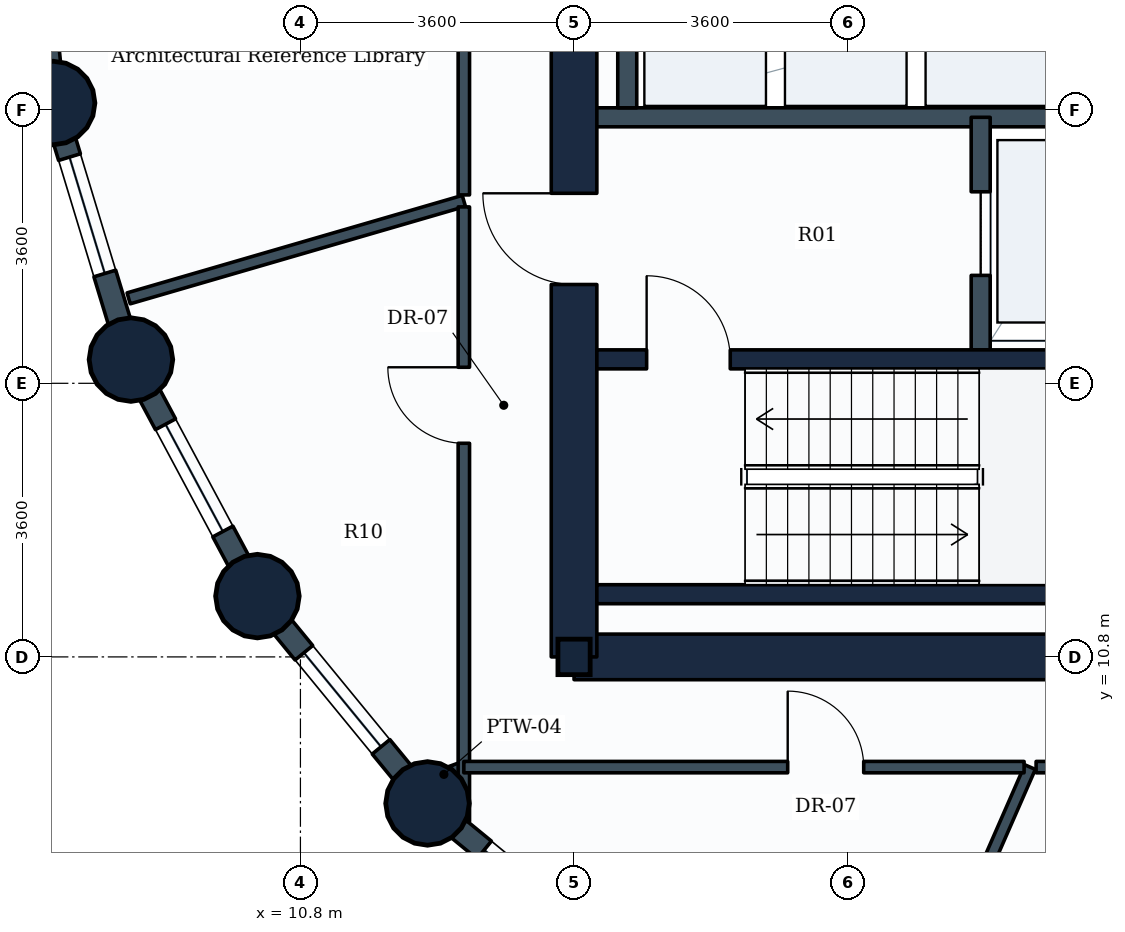
"""IFC4 building model, lengths in metres.
Left out: names, types, materials, properties, quantities, classifications, styles, units other than length and angle.
Written with IfcOpenShell. Run it as: python <this file> out.ifc"""

import sys

from ifc_helpers import new_model, si_unit, direction, frame, frame_2d, origin, origin_2d, place, context, subcontext, project, spatial, rectangle, circle, i_section, extrude, element, fill, save


model = new_model("IFC4")
c1 = context("Model", 3, precision=1e-05, world=origin(), true_north=direction((0.0, 1.0)))
c2 = subcontext(c1, "Body", "Model", "MODEL_VIEW")
j1 = project(units=[si_unit("LENGTHUNIT", "METRE"), si_unit("PLANEANGLEUNIT", "RADIAN")], contexts=[c1])
p1 = place(None, origin())
s1 = spatial("IfcSite", under=j1, at=p1, CompositionType="ELEMENT")
p2 = place(p1, origin())
s2 = spatial("IfcBuilding", under=s1, at=p2, CompositionType="ELEMENT")
p3 = place(p2, frame((0.0, 0.0, 84.0)))
s3 = spatial("IfcBuildingStorey", under=s2, at=p3, CompositionType="ELEMENT", Elevation=84.0)
for number, where, z_axis, x_axis in (
    (1, (7.546, 18.088, 0.0), (0.0, 0.0, 1.0), (1.0, 0.0, 0.0)),
    (2, (8.57, 14.712, 0.0), (0.0, 0.0, 1.0), (1.0, 0.0, 0.0)),
    (3, (10.234, 11.6, 0.0), (0.0, 0.0, 1.0), (1.0, 0.0, 0.0)),
    (4, (12.472, 8.872, 0.0), (0.0, 0.0, 1.0), (1.0, 0.0, 0.0)),
):
    element("IfcColumn", number, at=place(p3, frame(where, z_axis=z_axis, x_axis=x_axis)), inside=s3, PredefinedType="COLUMN", context=c2, shape_type="SweptSolid", body=[
        extrude(circle(Radius=0.55, at=origin_2d()), origin(), (0.0, 0.0, 1.0), 3.9),
    ])
p4 = place(p3, frame((14.4, 10.8, 0.0), z_axis=(0.0, 0.0, 1.0), x_axis=(1.0, 0.0, 0.0)))
e5 = element("IfcColumn", 5, at=p4, inside=s3, PredefinedType="COLUMN", context=c2, shape_type="SweptSolid", body=[
    extrude(i_section(OverallWidth=0.424, OverallDepth=0.467, WebThickness=0.033, FlangeThickness=0.053, FilletRadius=0.015, at=origin_2d()), origin(), (0.0, 0.0, 1.0), 3.9),
])
p5 = place(p3, frame((7.546, 18.088, 0.0), z_axis=(0.0, 0.0, 1.0), x_axis=(-0.09802417461, 0.995184033831, 0.0)))
e6 = element("IfcWall", 6, at=p5, inside=s3, PredefinedType="STANDARD", context=c2, shape_type="SweptSolid", body=[
    extrude(rectangle(XDim=3.529, YDim=0.3, at=frame_2d((1.765, 0.0))), origin(), (0.0, 0.0, 1.0), 2.93),
])
p6 = place(p5, frame((0.965, 0.0, 0.85)))
e7 = element("IfcOpeningElement", 7, at=p6, cuts=e6, PredefinedType="OPENING", context=c2, shape_type="SweptSolid", body=[
    extrude(rectangle(XDim=1.6, YDim=1.35, at=frame_2d((0.8, 0.675))), frame((0.0, 0.16, 0.0), z_axis=(0.0, -1.0, 0.0), x_axis=(1.0, 0.0, 0.0)), (0.0, 0.0, 1.0), 0.32),
])
p7 = place(p3, frame((8.57, 14.712, 0.0), z_axis=(0.0, 0.0, 1.0), x_axis=(-0.290305086481, 0.956934144423, 0.0)))
e8 = element("IfcWall", 8, at=p7, inside=s3, PredefinedType="STANDARD", context=c2, shape_type="SweptSolid", body=[
    extrude(rectangle(XDim=3.528, YDim=0.3, at=frame_2d((1.764, 0.0))), origin(), (0.0, 0.0, 1.0), 2.93),
])
p8 = place(p7, frame((1.184, 0.0, 0.85)))
e9 = element("IfcOpeningElement", 9, at=p8, cuts=e8, PredefinedType="OPENING", context=c2, shape_type="SweptSolid", body=[
    extrude(rectangle(XDim=1.6, YDim=1.35, at=frame_2d((0.8, 0.675))), frame((0.0, 0.16, 0.0), z_axis=(0.0, -1.0, 0.0), x_axis=(1.0, 0.0, 0.0)), (0.0, 0.0, 1.0), 0.32),
])
p9 = place(p3, frame((10.234, 11.6, 0.0), z_axis=(0.0, 0.0, 1.0), x_axis=(-0.47151087309, 0.881860247748, 0.0)))
e10 = element("IfcWall", 10, at=p9, inside=s3, PredefinedType="STANDARD", context=c2, shape_type="SweptSolid", body=[
    extrude(rectangle(XDim=3.529, YDim=0.3, at=frame_2d((1.764, 0.0))), origin(), (0.0, 0.0, 1.0), 2.93),
])
p10 = place(p9, frame((0.964, 0.0, 0.85)))
e11 = element("IfcOpeningElement", 11, at=p10, cuts=e10, PredefinedType="OPENING", context=c2, shape_type="SweptSolid", body=[
    extrude(rectangle(XDim=1.6, YDim=1.35, at=frame_2d((0.8, 0.675))), frame((0.0, 0.16, 0.0), z_axis=(0.0, -1.0, 0.0), x_axis=(1.0, 0.0, 0.0)), (0.0, 0.0, 1.0), 0.32),
])
p11 = place(p3, frame((12.472, 8.872, 0.0), z_axis=(0.0, 0.0, 1.0), x_axis=(-0.634258295121, 0.773121216285, 0.0)))
e12 = element("IfcWall", 12, at=p11, inside=s3, PredefinedType="STANDARD", context=c2, shape_type="SweptSolid", body=[
    extrude(rectangle(XDim=3.529, YDim=0.3, at=frame_2d((1.764, 0.0))), origin(), (0.0, 0.0, 1.0), 2.93),
])
p12 = place(p11, frame((0.964, 0.0, 0.85)))
e13 = element("IfcOpeningElement", 13, at=p12, cuts=e12, PredefinedType="OPENING", context=c2, shape_type="SweptSolid", body=[
    extrude(rectangle(XDim=1.6, YDim=1.35, at=frame_2d((0.8, 0.675))), frame((0.0, 0.16, 0.0), z_axis=(0.0, -1.0, 0.0), x_axis=(1.0, 0.0, 0.0)), (0.0, 0.0, 1.0), 0.32),
])
p13 = place(p3, frame((15.2, 6.634, 0.0), z_axis=(0.0, 0.0, 1.0), x_axis=(-0.773121216285, 0.634258295121, 0.0)))
e14 = element("IfcWall", 14, at=p13, inside=s3, PredefinedType="STANDARD", context=c2, shape_type="SweptSolid", body=[
    extrude(rectangle(XDim=3.529, YDim=0.3, at=frame_2d((1.764, 0.0))), origin(), (0.0, 0.0, 1.0), 2.93),
])
p14 = place(p13, frame((0.964, 0.0, 0.85)))
e15 = element("IfcOpeningElement", 15, at=p14, cuts=e14, PredefinedType="OPENING", context=c2, shape_type="SweptSolid", body=[
    extrude(rectangle(XDim=1.6, YDim=1.35, at=frame_2d((0.8, 0.675))), frame((0.0, 0.16, 0.0), z_axis=(0.0, -1.0, 0.0), x_axis=(1.0, 0.0, 0.0)), (0.0, 0.0, 1.0), 0.32),
])
p15 = place(p3, frame((14.4, 10.8, 0.0), z_axis=(0.0, 0.0, 1.0), x_axis=(1.0, 0.0, 0.0)))
e16 = element("IfcWall", 16, at=p15, inside=s3, PredefinedType="SHEAR", context=c2, shape_type="SweptSolid", body=[
    extrude(rectangle(XDim=18.0, YDim=0.6, at=frame_2d((9.0, 0.0))), origin(), (0.0, 0.0, 1.0), 3.65),
])
p16 = place(p3, frame((14.4, 10.8, 0.0), z_axis=(0.0, 0.0, 1.0), x_axis=(0.0, 1.0, 0.0)))
e17 = element("IfcWall", 17, at=p16, inside=s3, PredefinedType="SHEAR", context=c2, shape_type="SweptSolid", body=[
    extrude(rectangle(XDim=14.4, YDim=0.6, at=frame_2d((7.2, 0.0))), origin(), (0.0, 0.0, 1.0), 3.65),
])
p17 = place(p16, frame((11.05, 0.0, 0.0)))
e18 = element("IfcOpeningElement", 18, at=p17, cuts=e17, PredefinedType="OPENING", context=c2, shape_type="SweptSolid", body=[
    extrude(rectangle(XDim=1.1, YDim=2.1, at=frame_2d((0.55, 1.05))), frame((0.0, 0.31, 0.0), z_axis=(0.0, -1.0, 0.0), x_axis=(1.0, 0.0, 0.0)), (0.0, 0.0, 1.0), 0.62),
])
p18 = place(p16, frame((4.9, 0.0, 0.0)))
e19 = element("IfcOpeningElement", 19, at=p18, cuts=e17, PredefinedType="OPENING", context=c2, shape_type="SweptSolid", body=[
    extrude(rectangle(XDim=1.2, YDim=2.1, at=frame_2d((0.6, 1.05))), frame((0.0, 0.31, 0.0), z_axis=(0.0, -1.0, 0.0), x_axis=(1.0, 0.0, 0.0)), (0.0, 0.0, 1.0), 0.62),
])
p19 = place(p3, frame((14.7, 11.625, 0.0), z_axis=(0.0, 0.0, 1.0), x_axis=(1.0, 0.0, 0.0)))
e20 = element("IfcWall", 20, at=p19, inside=s3, PredefinedType="SHEAR", context=c2, shape_type="SweptSolid", body=[
    extrude(rectangle(XDim=8.65, YDim=0.25, at=frame_2d((4.325, 0.0))), origin(), (0.0, 0.0, 1.0), 3.65),
])
p20 = place(p3, frame((14.7, 14.715, 0.0), z_axis=(0.0, 0.0, 1.0), x_axis=(1.0, 0.0, 0.0)))
e21 = element("IfcWall", 21, at=p20, inside=s3, PredefinedType="SHEAR", context=c2, shape_type="SweptSolid", body=[
    extrude(rectangle(XDim=8.65, YDim=0.25, at=frame_2d((4.325, 0.0))), origin(), (0.0, 0.0, 1.0), 3.65),
])
p21 = place(p20, frame((0.655, 0.0, 0.0)))
e22 = element("IfcOpeningElement", 22, at=p21, cuts=e21, PredefinedType="OPENING", context=c2, shape_type="SweptSolid", body=[
    extrude(rectangle(XDim=1.1, YDim=2.1, at=frame_2d((0.55, 1.05))), frame((0.0, 0.135, 0.0), z_axis=(0.0, -1.0, 0.0), x_axis=(1.0, 0.0, 0.0)), (0.0, 0.0, 1.0), 0.27),
])
p22 = place(p3, frame((14.65, 17.9, 0.0), z_axis=(0.0, 0.0, 1.0), x_axis=(1.0, 0.0, 0.0)))
e23 = element("IfcWall", 23, at=p22, inside=s3, PredefinedType="PARTITIONING", context=c2, shape_type="SweptSolid", body=[
    extrude(rectangle(XDim=7.15, YDim=0.25, at=frame_2d((3.575, 0.0))), origin(), (0.0, 0.0, 1.0), 3.635),
])
p23 = place(p3, frame((19.75, 14.84, 0.0), z_axis=(0.0, 0.0, 1.0), x_axis=(0.0, 1.0, 0.0)))
e24 = element("IfcWall", 24, at=p23, inside=s3, PredefinedType="PARTITIONING", context=c2, shape_type="SweptSolid", body=[
    extrude(rectangle(XDim=3.06, YDim=0.25, at=frame_2d((1.53, 0.0))), origin(), (0.0, 0.0, 1.0), 3.635),
])
p24 = place(p23, frame((0.98, 0.0, 0.0)))
e25 = element("IfcOpeningElement", 25, at=p24, cuts=e24, PredefinedType="OPENING", context=c2, shape_type="SweptSolid", body=[
    extrude(rectangle(XDim=1.1, YDim=2.1, at=frame_2d((0.55, 1.05))), frame((0.0, 0.135, 0.0), z_axis=(0.0, -1.0, 0.0), x_axis=(1.0, 0.0, 0.0)), (0.0, 0.0, 1.0), 0.27),
])
p25 = place(p3, frame((15.1, 18.025, 0.0), z_axis=(0.0, 0.0, 1.0), x_axis=(0.0, 1.0, 0.0)))
e26 = element("IfcWall", 26, at=p25, inside=s3, PredefinedType="PARTITIONING", context=c2, shape_type="SweptSolid", body=[
    extrude(rectangle(XDim=1.975, YDim=0.25, at=frame_2d((0.988, 0.0))), origin(), (0.0, 0.0, 1.0), 3.635),
])
p26 = place(p3, frame((12.95, 16.8, 0.0), z_axis=(0.0, 0.0, 1.0), x_axis=(-0.960237798553, -0.279183398915, 0.0)))
e27 = element("IfcWall", 27, at=p26, inside=s3, PredefinedType="PARTITIONING", context=c2, shape_type="SweptSolid", body=[
    extrude(rectangle(XDim=4.593, YDim=0.15, at=frame_2d((2.296, 0.0))), origin(), (0.0, 0.0, 1.0), 2.93),
])
p27 = place(p3, frame((12.95, 9.35, 0.0), z_axis=(0.0, 0.0, 1.0), x_axis=(-0.939538101119, -0.342444384601, 0.0)))
e28 = element("IfcWall", 28, at=p27, inside=s3, PredefinedType="PARTITIONING", context=c2, shape_type="SweptSolid", body=[
    extrude(rectangle(XDim=0.559, YDim=0.15, at=frame_2d((0.279, 0.0))), origin(), (0.0, 0.0, 1.0), 2.93),
])
p28 = place(p3, frame((20.4, 9.35, 0.0), z_axis=(0.0, 0.0, 1.0), x_axis=(-0.400957621756, -0.916096602742, 0.0)))
e29 = element("IfcWall", 29, at=p28, inside=s3, PredefinedType="PARTITIONING", context=c2, shape_type="SweptSolid", body=[
    extrude(rectangle(XDim=4.706, YDim=0.15, at=frame_2d((2.353, 0.0))), origin(), (0.0, 0.0, 1.0), 2.93),
])
p29 = place(p3, frame((12.95, 16.879, 0.0), z_axis=(0.0, 0.0, 1.0), x_axis=(0.0, 1.0, 0.0)))
e30 = element("IfcWall", 30, at=p29, inside=s3, PredefinedType="PARTITIONING", context=c2, shape_type="SweptSolid", body=[
    extrude(rectangle(XDim=8.242, YDim=0.15, at=frame_2d((4.121, 0.0))), origin(), (0.0, 0.0, 1.0), 3.19),
])
p30 = place(p29, frame((3.621, 0.0, 0.0)))
e31 = element("IfcOpeningElement", 31, at=p30, cuts=e30, PredefinedType="OPENING", context=c2, shape_type="SweptSolid", body=[
    extrude(rectangle(XDim=1.0, YDim=2.1, at=frame_2d((0.5, 1.05))), frame((0.0, 0.085, 0.0), z_axis=(0.0, -1.0, 0.0), x_axis=(1.0, 0.0, 0.0)), (0.0, 0.0, 1.0), 0.17),
])
p31 = place(p3, frame((12.95, 8.634, 0.0), z_axis=(0.0, 0.0, 1.0), x_axis=(0.0, 1.0, 0.0)))
e32 = element("IfcWall", 32, at=p31, inside=s3, PredefinedType="PARTITIONING", context=c2, shape_type="SweptSolid", body=[
    extrude(rectangle(XDim=8.087, YDim=0.15, at=frame_2d((4.043, 0.0))), origin(), (0.0, 0.0, 1.0), 2.93),
])
p32 = place(p31, frame((4.977, 0.0, 0.0)))
e33 = element("IfcOpeningElement", 33, at=p32, cuts=e32, PredefinedType="OPENING", context=c2, shape_type="SweptSolid", body=[
    extrude(rectangle(XDim=1.0, YDim=2.1, at=frame_2d((0.5, 1.05))), frame((0.0, 0.085, 0.0), z_axis=(0.0, -1.0, 0.0), x_axis=(1.0, 0.0, 0.0)), (0.0, 0.0, 1.0), 0.17),
])
p33 = place(p3, frame((12.95, 9.35, 0.0), z_axis=(0.0, 0.0, 1.0), x_axis=(1.0, 0.0, 0.0)))
e34 = element("IfcWall", 34, at=p33, inside=s3, PredefinedType="PARTITIONING", context=c2, shape_type="SweptSolid", body=[
    extrude(rectangle(XDim=7.371, YDim=0.15, at=frame_2d((3.686, 0.0))), origin(), (0.0, 0.0, 1.0), 3.19),
])
p34 = place(p33, frame((4.261, 0.0, 0.0)))
e35 = element("IfcOpeningElement", 35, at=p34, cuts=e34, PredefinedType="OPENING", context=c2, shape_type="SweptSolid", body=[
    extrude(rectangle(XDim=1.0, YDim=2.1, at=frame_2d((0.5, 1.05))), frame((0.0, 0.085, 0.0), z_axis=(0.0, -1.0, 0.0), x_axis=(1.0, 0.0, 0.0)), (0.0, 0.0, 1.0), 0.17),
])
p35 = place(p3, frame((20.479, 9.35, 0.0), z_axis=(0.0, 0.0, 1.0), x_axis=(1.0, 0.0, 0.0)))
e36 = element("IfcWall", 36, at=p35, inside=s3, PredefinedType="PARTITIONING", context=c2, shape_type="SweptSolid", body=[
    extrude(rectangle(XDim=8.242, YDim=0.15, at=frame_2d((4.121, 0.0))), origin(), (0.0, 0.0, 1.0), 3.18),
])
p36 = place(p35, frame((3.939, 0.0, 0.0)))
e37 = element("IfcOpeningElement", 37, at=p36, cuts=e36, PredefinedType="OPENING", context=c2, shape_type="SweptSolid", body=[
    extrude(rectangle(XDim=1.0, YDim=2.1, at=frame_2d((0.5, 1.05))), frame((0.0, 0.085, 0.0), z_axis=(0.0, -1.0, 0.0), x_axis=(1.0, 0.0, 0.0)), (0.0, 0.0, 1.0), 0.17),
])
p37 = place(p8, origin())
e38 = element("IfcWindow", 38, at=p37, inside=s3, PartitioningType="SINGLE_PANEL", PredefinedType="WINDOW", context=c2, shape_type="SweptSolid", body=[
    extrude(rectangle(XDim=1.6, YDim=1.35, at=frame_2d((0.8, 0.675))), frame((0.0, 0.03, 0.0), z_axis=(0.0, -1.0, 0.0), x_axis=(1.0, 0.0, 0.0)), (0.0, 0.0, 1.0), 0.06),
])
fill(e9, e38)
p38 = place(p10, origin())
e39 = element("IfcWindow", 39, at=p38, inside=s3, PartitioningType="SINGLE_PANEL", PredefinedType="WINDOW", context=c2, shape_type="SweptSolid", body=[
    extrude(rectangle(XDim=1.6, YDim=1.35, at=frame_2d((0.8, 0.675))), frame((0.0, 0.03, 0.0), z_axis=(0.0, -1.0, 0.0), x_axis=(1.0, 0.0, 0.0)), (0.0, 0.0, 1.0), 0.06),
])
fill(e11, e39)
p39 = place(p12, origin())
e40 = element("IfcWindow", 40, at=p39, inside=s3, PartitioningType="SINGLE_PANEL", PredefinedType="WINDOW", context=c2, shape_type="SweptSolid", body=[
    extrude(rectangle(XDim=1.6, YDim=1.35, at=frame_2d((0.8, 0.675))), frame((0.0, 0.03, 0.0), z_axis=(0.0, -1.0, 0.0), x_axis=(1.0, 0.0, 0.0)), (0.0, 0.0, 1.0), 0.06),
])
fill(e13, e40)
p40 = place(p14, origin())
e41 = element("IfcWindow", 41, at=p40, inside=s3, PartitioningType="SINGLE_PANEL", PredefinedType="WINDOW", context=c2, shape_type="SweptSolid", body=[
    extrude(rectangle(XDim=1.6, YDim=1.35, at=frame_2d((0.8, 0.675))), frame((0.0, 0.03, 0.0), z_axis=(0.0, -1.0, 0.0), x_axis=(1.0, 0.0, 0.0)), (0.0, 0.0, 1.0), 0.06),
])
fill(e15, e41)
p41 = place(p21, origin())
e42 = element("IfcDoor", 42, at=p41, inside=s3, OperationType="SINGLE_SWING_LEFT", PredefinedType="DOOR", context=c2, shape_type="SweptSolid", body=[
    extrude(rectangle(XDim=1.1, YDim=2.1, at=frame_2d((0.55, 1.05))), frame((0.0, 0.025, 0.0), z_axis=(0.0, -1.0, 0.0), x_axis=(1.0, 0.0, 0.0)), (0.0, 0.0, 1.0), 0.05),
])
fill(e22, e42)
p42 = place(p24, origin())
e43 = element("IfcDoor", 43, at=p42, inside=s3, OperationType="SLIDING_TO_LEFT", PredefinedType="DOOR", context=c2, shape_type="SweptSolid", body=[
    extrude(rectangle(XDim=1.1, YDim=2.1, at=frame_2d((0.55, 1.05))), frame((0.0, 0.025, 0.0), z_axis=(0.0, -1.0, 0.0), x_axis=(1.0, 0.0, 0.0)), (0.0, 0.0, 1.0), 0.05),
])
fill(e25, e43)
p43 = place(p18, origin())
e44 = element("IfcDoor", 44, at=p43, inside=s3, OperationType="SINGLE_SWING_RIGHT", PredefinedType="DOOR", context=c2, shape_type="SweptSolid", body=[
    extrude(rectangle(XDim=1.2, YDim=2.1, at=frame_2d((0.6, 1.05))), frame((0.0, 0.025, 0.0), z_axis=(0.0, -1.0, 0.0), x_axis=(1.0, 0.0, 0.0)), (0.0, 0.0, 1.0), 0.05),
])
fill(e19, e44)
p44 = place(p32, origin())
e45 = element("IfcDoor", 45, at=p44, inside=s3, OperationType="SINGLE_SWING_RIGHT", PredefinedType="DOOR", context=c2, shape_type="SweptSolid", body=[
    extrude(rectangle(XDim=1.0, YDim=2.1, at=frame_2d((0.5, 1.05))), frame((0.0, 0.025, 0.0), z_axis=(0.0, -1.0, 0.0), x_axis=(1.0, 0.0, 0.0)), (0.0, 0.0, 1.0), 0.05),
])
fill(e33, e45)
p45 = place(p34, origin())
e46 = element("IfcDoor", 46, at=p45, inside=s3, OperationType="SINGLE_SWING_LEFT", PredefinedType="DOOR", context=c2, shape_type="SweptSolid", body=[
    extrude(rectangle(XDim=1.0, YDim=2.1, at=frame_2d((0.5, 1.05))), frame((0.0, 0.025, 0.0), z_axis=(0.0, -1.0, 0.0), x_axis=(1.0, 0.0, 0.0)), (0.0, 0.0, 1.0), 0.05),
])
fill(e35, e46)
save(model, sys.argv[1])
